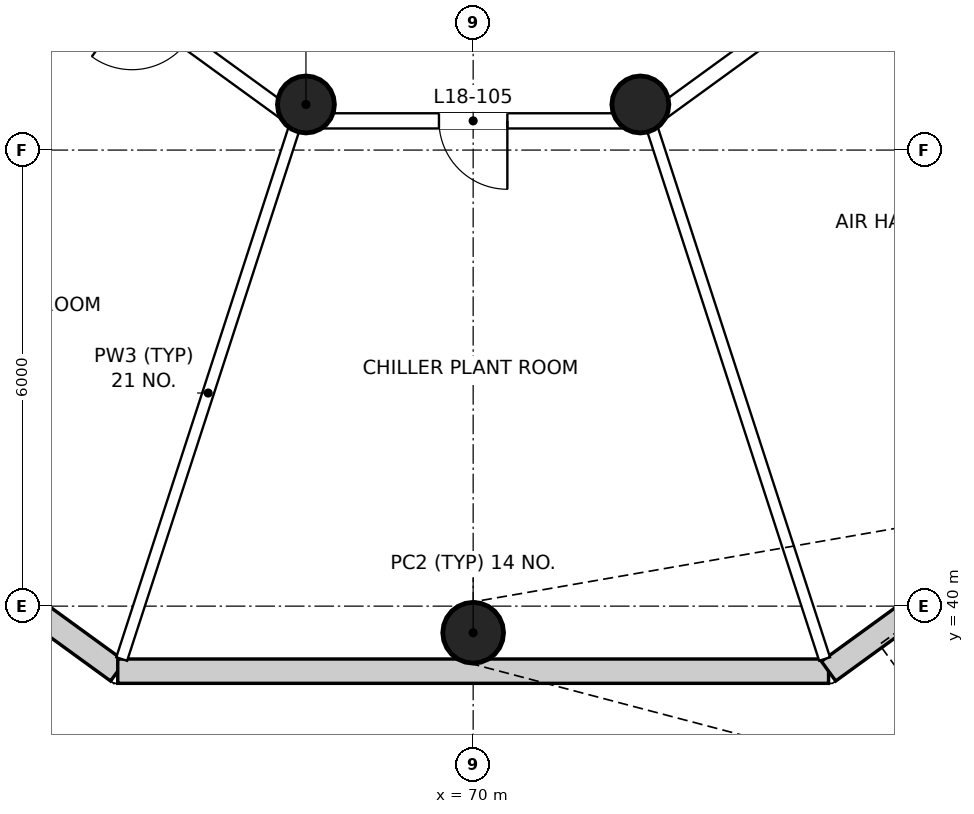
"""IFC4 building model, lengths in metres.
Left out: names, types, materials, properties, quantities, classifications, styles, units other than length and angle.
Written with IfcOpenShell. Run it as: python <this file> out.ifc"""

import sys

from ifc_helpers import new_model, si_unit, direction, frame, frame_2d, origin, origin_2d, place, context, subcontext, project, spatial, rectangle, circle, extrude, element, fill, save


model = new_model("IFC4")
c1 = context("Model", 3, precision=1e-05, world=origin(), true_north=direction((0.0, 1.0)))
c2 = subcontext(c1, "Body", "Model", "MODEL_VIEW")
j1 = project(units=[si_unit("LENGTHUNIT", "METRE"), si_unit("PLANEANGLEUNIT", "RADIAN")], contexts=[c1])
p1 = place(None, origin())
s1 = spatial("IfcSite", under=j1, at=p1, CompositionType="ELEMENT")
p2 = place(p1, origin())
s2 = spatial("IfcBuilding", under=s1, at=p2, CompositionType="ELEMENT")
p3 = place(p2, frame((0.0, 0.0, 85.8)))
s3 = spatial("IfcBuildingStorey", under=s2, at=p3, CompositionType="ELEMENT", Elevation=85.8)
p4 = place(p3, frame((70.0, 39.65, 0.0), z_axis=(0.0, 0.0, 1.0), x_axis=(1.0, 0.0, 0.0)))
e1 = element("IfcColumn", 1, at=p4, inside=s3, PredefinedType="COLUMN", context=c2, shape_type="SweptSolid", body=[
    extrude(circle(Radius=0.4, at=origin_2d()), origin(), (0.0, 0.0, 1.0), 5.0),
])
for number, where, z_axis, x_axis in (
    (2, (67.8, 46.6, 0.0), (0.0, 0.0, 1.0), (1.0, 0.0, 0.0)),
    (3, (72.2, 46.6, 0.0), (0.0, 0.0, 1.0), (1.0, 0.0, 0.0)),
):
    element("IfcColumn", number, at=place(p3, frame(where, z_axis=z_axis, x_axis=x_axis)), inside=s3, PredefinedType="COLUMN", context=c2, shape_type="SweptSolid", body=[
        extrude(circle(Radius=0.375, at=origin_2d()), origin(), (0.0, 0.0, 1.0), 5.0),
    ])
p5 = place(p3, frame((47.033, 52.434, 0.0), z_axis=(0.0, 0.0, 1.0), x_axis=(0.809018497564, -0.587783183325, 0.0)))
e4 = element("IfcWall", 4, at=p5, inside=s3, PredefinedType="SOLIDWALL", context=c2, shape_type="SweptSolid", body=[
    extrude(rectangle(XDim=22.609, YDim=0.32, at=frame_2d((11.305, 0.0))), origin(), (0.0, 0.0, 1.0), 4.7),
])
p6 = place(p3, frame((65.324, 39.144, 0.0), z_axis=(0.0, 0.0, 1.0), x_axis=(1.0, 0.0, 0.0)))
e5 = element("IfcWall", 5, at=p6, inside=s3, PredefinedType="SOLIDWALL", context=c2, shape_type="SweptSolid", body=[
    extrude(rectangle(XDim=9.352, YDim=0.32, at=frame_2d((4.676, 0.0))), origin(), (0.0, 0.0, 1.0), 4.7),
])
p7 = place(p3, frame((74.676, 39.144, 0.0), z_axis=(0.0, 0.0, 1.0), x_axis=(0.809018497564, 0.587783183325, 0.0)))
e6 = element("IfcWall", 6, at=p7, inside=s3, PredefinedType="SOLIDWALL", context=c2, shape_type="SweptSolid", body=[
    extrude(rectangle(XDim=22.609, YDim=0.32, at=frame_2d((11.305, 0.0))), origin(), (0.0, 0.0, 1.0), 4.7),
])
p8 = place(p3, frame((85.257, 55.781, 0.0), z_axis=(0.0, 0.0, 1.0), x_axis=(-0.809010618519, -0.587794027805, 0.0)))
e7 = element("IfcWall", 7, at=p8, inside=s3, PredefinedType="PARTITIONING", context=c2, shape_type="SweptSolid", body=[
    extrude(rectangle(XDim=15.954, YDim=0.2, at=frame_2d((7.977, 0.0))), origin(), (0.0, 0.0, 1.0), 3.7),
])
p9 = place(p8, frame((11.81, 0.0, 0.0)))
e8 = element("IfcOpeningElement", 8, at=p9, cuts=e7, PredefinedType="OPENING", context=c2, shape_type="SweptSolid", body=[
    extrude(rectangle(XDim=0.9, YDim=2.1, at=frame_2d((0.45, 1.05))), frame((0.0, 0.11, 0.0), z_axis=(0.0, -1.0, 0.0), x_axis=(1.0, 0.0, 0.0)), (0.0, 0.0, 1.0), 0.22),
])
p10 = place(p8, frame((5.434, 0.0, 0.0)))
e9 = element("IfcOpeningElement", 9, at=p10, cuts=e7, PredefinedType="OPENING", context=c2, shape_type="SweptSolid", body=[
    extrude(rectangle(XDim=0.9, YDim=2.1, at=frame_2d((0.45, 1.05))), frame((0.0, 0.11, 0.0), z_axis=(0.0, -1.0, 0.0), x_axis=(1.0, 0.0, 0.0)), (0.0, 0.0, 1.0), 0.22),
])
p11 = place(p3, frame((72.291, 46.384, 0.0), z_axis=(0.0, 0.0, 1.0), x_axis=(-1.0, 0.0, 0.0)))
e10 = element("IfcWall", 10, at=p11, inside=s3, PredefinedType="PARTITIONING", context=c2, shape_type="SweptSolid", body=[
    extrude(rectangle(XDim=4.582, YDim=0.2, at=frame_2d((2.291, 0.0))), origin(), (0.0, 0.0, 1.0), 3.7),
])
p12 = place(p11, frame((1.841, 0.0, 0.0)))
e11 = element("IfcOpeningElement", 11, at=p12, cuts=e10, PredefinedType="OPENING", context=c2, shape_type="SweptSolid", body=[
    extrude(rectangle(XDim=0.9, YDim=2.1, at=frame_2d((0.45, 1.05))), frame((0.0, 0.11, 0.0), z_axis=(0.0, -1.0, 0.0), x_axis=(1.0, 0.0, 0.0)), (0.0, 0.0, 1.0), 0.22),
])
p13 = place(p3, frame((67.65, 46.403, 0.0), z_axis=(0.0, 0.0, 1.0), x_axis=(-0.809010618519, 0.587794027805, 0.0)))
e12 = element("IfcWall", 12, at=p13, inside=s3, PredefinedType="PARTITIONING", context=c2, shape_type="SweptSolid", body=[
    extrude(rectangle(XDim=15.954, YDim=0.2, at=frame_2d((7.977, 0.0))), origin(), (0.0, 0.0, 1.0), 3.7),
])
p14 = place(p13, frame((12.753, 0.0, 0.0)))
e13 = element("IfcOpeningElement", 13, at=p14, cuts=e12, PredefinedType="OPENING", context=c2, shape_type="SweptSolid", body=[
    extrude(rectangle(XDim=0.9, YDim=2.1, at=frame_2d((0.45, 1.05))), frame((0.0, 0.11, 0.0), z_axis=(0.0, -1.0, 0.0), x_axis=(1.0, 0.0, 0.0)), (0.0, 0.0, 1.0), 0.22),
])
p15 = place(p13, frame((6.969, 0.0, 0.0)))
e14 = element("IfcOpeningElement", 14, at=p15, cuts=e12, PredefinedType="OPENING", context=c2, shape_type="SweptSolid", body=[
    extrude(rectangle(XDim=0.9, YDim=2.1, at=frame_2d((0.45, 1.05))), frame((0.0, 0.11, 0.0), z_axis=(0.0, -1.0, 0.0), x_axis=(1.0, 0.0, 0.0)), (0.0, 0.0, 1.0), 0.22),
])
p16 = place(p13, frame((1.743, 0.0, 0.0)))
e15 = element("IfcOpeningElement", 15, at=p16, cuts=e12, PredefinedType="OPENING", context=c2, shape_type="SweptSolid", body=[
    extrude(rectangle(XDim=0.9, YDim=2.1, at=frame_2d((0.45, 1.05))), frame((0.0, 0.11, 0.0), z_axis=(0.0, -1.0, 0.0), x_axis=(1.0, 0.0, 0.0)), (0.0, 0.0, 1.0), 0.22),
])
p17 = place(p3, frame((65.376, 39.304, 0.0), z_axis=(0.0, 0.0, 1.0), x_axis=(0.309013310507, 0.951057713249, 0.0)))
e16 = element("IfcWall", 16, at=p17, inside=s3, PredefinedType="PARTITIONING", context=c2, shape_type="SweptSolid", body=[
    extrude(rectangle(XDim=7.359, YDim=0.15, at=frame_2d((3.68, 0.0))), origin(), (0.0, 0.0, 1.0), 3.7),
])
p18 = place(p3, frame((74.624, 39.304, 0.0), z_axis=(0.0, 0.0, 1.0), x_axis=(-0.309013310507, 0.951057713249, 0.0)))
e17 = element("IfcWall", 17, at=p18, inside=s3, PredefinedType="PARTITIONING", context=c2, shape_type="SweptSolid", body=[
    extrude(rectangle(XDim=7.359, YDim=0.15, at=frame_2d((3.68, 0.0))), origin(), (0.0, 0.0, 1.0), 4.7),
])
p19 = place(p12, origin())
e18 = element("IfcDoor", 18, at=p19, inside=s3, OperationType="SINGLE_SWING_LEFT", PredefinedType="DOOR", context=c2, shape_type="SweptSolid", body=[
    extrude(rectangle(XDim=0.9, YDim=2.1, at=frame_2d((0.45, 1.05))), frame((0.0, 0.025, 0.0), z_axis=(0.0, -1.0, 0.0), x_axis=(1.0, 0.0, 0.0)), (0.0, 0.0, 1.0), 0.05),
])
fill(e11, e18)
save(model, sys.argv[1])
